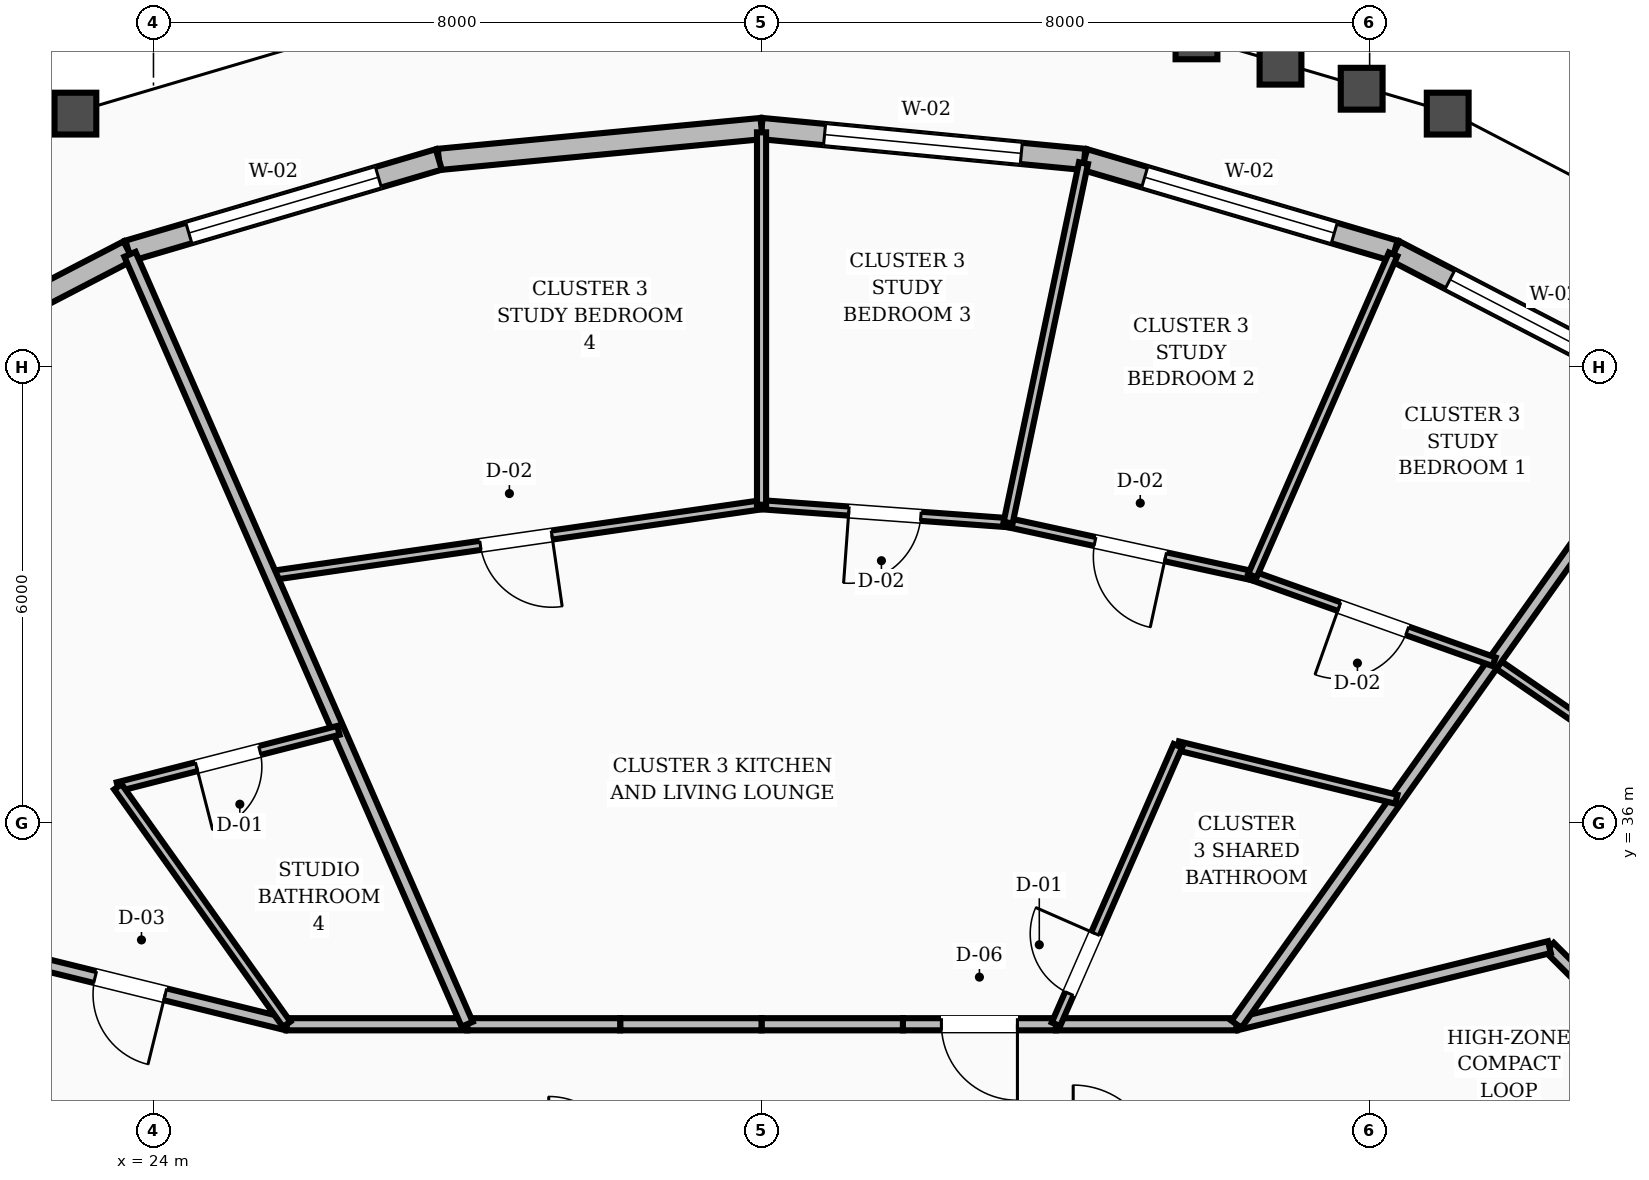
"""IFC4 building model, lengths in metres.
Left out: names, types, materials, properties, quantities, classifications, styles, units other than length and angle.
Written with IfcOpenShell. Run it as: python <this file> out.ifc"""

import sys

from ifc_helpers import new_model, si_unit, direction, frame, frame_2d, origin, place, context, subcontext, project, spatial, rectangle, extrude, element, fill, save


model = new_model("IFC4")
c1 = context("Model", 3, precision=1e-05, world=origin(), true_north=direction((0.0, 1.0)))
c2 = subcontext(c1, "Body", "Model", "MODEL_VIEW")
j1 = project(units=[si_unit("LENGTHUNIT", "METRE"), si_unit("PLANEANGLEUNIT", "RADIAN")], contexts=[c1])
p1 = place(None, origin())
s1 = spatial("IfcSite", under=j1, at=p1, CompositionType="ELEMENT")
p2 = place(p1, origin())
s2 = spatial("IfcBuilding", under=s1, at=p2, CompositionType="ELEMENT")
p3 = place(p2, frame((0.0, 0.0, 240.0)))
s3 = spatial("IfcBuildingStorey", under=s2, at=p3, CompositionType="ELEMENT", Elevation=240.0)
p4 = place(p3, frame((44.092, 41.572, 0.0), z_axis=(0.0, 0.0, 1.0), x_axis=(-0.887588000353, 0.460638189504, 0.0)))
e1 = element("IfcWall", 1, at=p4, inside=s3, PredefinedType="STANDARD", context=c2, shape_type="SweptSolid", body=[
    extrude(rectangle(XDim=4.24, YDim=0.28, at=frame_2d((2.12, 0.0))), origin(), (0.0, 0.0, 1.0), 2.88),
])
p5 = place(p4, frame((0.82, 0.0, 0.8)))
e2 = element("IfcOpeningElement", 2, at=p5, cuts=e1, PredefinedType="OPENING", context=c2, shape_type="SweptSolid", body=[
    extrude(rectangle(XDim=2.6, YDim=1.65, at=frame_2d((1.3, 0.825))), frame((0.0, 0.15, 0.0), z_axis=(0.0, -1.0, 0.0), x_axis=(1.0, 0.0, 0.0)), (0.0, 0.0, 1.0), 0.3),
])
p6 = place(p3, frame((40.329, 43.525, 0.0), z_axis=(0.0, 0.0, 1.0), x_axis=(-0.95925857755, 0.28252961154, 0.0)))
e3 = element("IfcWall", 3, at=p6, inside=s3, PredefinedType="STANDARD", context=c2, shape_type="SweptSolid", body=[
    extrude(rectangle(XDim=4.257, YDim=0.28, at=frame_2d((2.128, 0.0))), origin(), (0.0, 0.0, 1.0), 2.88),
])
p7 = place(p6, frame((0.828, 0.0, 0.8)))
e4 = element("IfcOpeningElement", 4, at=p7, cuts=e3, PredefinedType="OPENING", context=c2, shape_type="SweptSolid", body=[
    extrude(rectangle(XDim=2.6, YDim=1.65, at=frame_2d((1.3, 0.825))), frame((0.0, 0.15, 0.0), z_axis=(0.0, -1.0, 0.0), x_axis=(1.0, 0.0, 0.0)), (0.0, 0.0, 1.0), 0.3),
])
p8 = place(p3, frame((36.246, 44.728, 0.0), z_axis=(0.0, 0.0, 1.0), x_axis=(-0.995459644973, 0.09518453252, 0.0)))
e5 = element("IfcWall", 5, at=p8, inside=s3, PredefinedType="STANDARD", context=c2, shape_type="SweptSolid", body=[
    extrude(rectangle(XDim=4.265, YDim=0.28, at=frame_2d((2.133, 0.0))), origin(), (0.0, 0.0, 1.0), 2.88),
])
p9 = place(p8, frame((0.833, 0.0, 0.8)))
e6 = element("IfcOpeningElement", 6, at=p9, cuts=e5, PredefinedType="OPENING", context=c2, shape_type="SweptSolid", body=[
    extrude(rectangle(XDim=2.6, YDim=1.65, at=frame_2d((1.3, 0.825))), frame((0.0, 0.15, 0.0), z_axis=(0.0, -1.0, 0.0), x_axis=(1.0, 0.0, 0.0)), (0.0, 0.0, 1.0), 0.3),
])
p10 = place(p3, frame((32.0, 45.134, 0.0), z_axis=(0.0, 0.0, 1.0), x_axis=(-0.995459644973, -0.09518453252, 0.0)))
e7 = element("IfcWall", 7, at=p10, inside=s3, PredefinedType="STANDARD", context=c2, shape_type="SweptSolid", body=[
    extrude(rectangle(XDim=4.265, YDim=0.28, at=frame_2d((2.133, 0.0))), origin(), (0.0, 0.0, 1.0), 2.88),
])
p11 = place(p3, frame((27.754, 44.728, 0.0), z_axis=(0.0, 0.0, 1.0), x_axis=(-0.95925857755, -0.28252961154, 0.0)))
e8 = element("IfcWall", 8, at=p11, inside=s3, PredefinedType="STANDARD", context=c2, shape_type="SweptSolid", body=[
    extrude(rectangle(XDim=4.257, YDim=0.28, at=frame_2d((2.128, 0.0))), origin(), (0.0, 0.0, 1.0), 2.88),
])
p12 = place(p11, frame((0.828, 0.0, 0.8)))
e9 = element("IfcOpeningElement", 9, at=p12, cuts=e8, PredefinedType="OPENING", context=c2, shape_type="SweptSolid", body=[
    extrude(rectangle(XDim=2.6, YDim=1.65, at=frame_2d((1.3, 0.825))), frame((0.0, 0.15, 0.0), z_axis=(0.0, -1.0, 0.0), x_axis=(1.0, 0.0, 0.0)), (0.0, 0.0, 1.0), 0.3),
])
p13 = place(p3, frame((23.671, 43.525, 0.0), z_axis=(0.0, 0.0, 1.0), x_axis=(-0.887588000353, -0.460638189504, 0.0)))
e10 = element("IfcWall", 10, at=p13, inside=s3, PredefinedType="STANDARD", context=c2, shape_type="SweptSolid", body=[
    extrude(rectangle(XDim=4.24, YDim=0.28, at=frame_2d((2.12, 0.0))), origin(), (0.0, 0.0, 1.0), 2.88),
])
p14 = place(p3, frame((44.427, 32.303, 0.0), z_axis=(0.0, 0.0, 1.0), x_axis=(-0.707106781187, 0.707106781187, 0.0)))
e11 = element("IfcWall", 11, at=p14, inside=s3, PredefinedType="SOLIDWALL", context=c2, shape_type="SweptSolid", body=[
    extrude(rectangle(XDim=2.916, YDim=0.16, at=frame_2d((1.458, 0.0))), origin(), (0.0, 0.0, 1.0), 2.87),
])
p15 = place(p3, frame((42.365, 34.365, 0.0), z_axis=(0.0, 0.0, 1.0), x_axis=(-0.970939799552, -0.239323850978, 0.0)))
e12 = element("IfcWall", 12, at=p15, inside=s3, PredefinedType="SOLIDWALL", context=c2, shape_type="SweptSolid", body=[
    extrude(rectangle(XDim=4.241, YDim=0.16, at=frame_2d((2.12, 0.0))), origin(), (0.0, 0.0, 1.0), 2.87),
])
p16 = place(p3, frame((38.248, 33.35, 0.0), z_axis=(0.0, 0.0, 1.0), x_axis=(-1.0, 0.0, 0.0)))
e13 = element("IfcWall", 13, at=p16, inside=s3, PredefinedType="SOLIDWALL", context=c2, shape_type="SweptSolid", body=[
    extrude(rectangle(XDim=2.375, YDim=0.16, at=frame_2d((1.188, 0.0))), origin(), (0.0, 0.0, 1.0), 2.87),
])
p17 = place(p3, frame((35.873, 33.35, 0.0), z_axis=(0.0, 0.0, 1.0), x_axis=(-1.0, 0.0, 0.0)))
e14 = element("IfcWall", 14, at=p17, inside=s3, PredefinedType="SOLIDWALL", context=c2, shape_type="SweptSolid", body=[
    extrude(rectangle(XDim=2.013, YDim=0.16, at=frame_2d((1.006, 0.0))), origin(), (0.0, 0.0, 1.0), 2.87),
])
p18 = place(p17, frame((0.507, 0.0, 0.0)))
e15 = element("IfcOpeningElement", 15, at=p18, cuts=e14, PredefinedType="OPENING", context=c2, shape_type="SweptSolid", body=[
    extrude(rectangle(XDim=1.0, YDim=2.1, at=frame_2d((0.5, 1.05))), frame((0.0, 0.09, 0.0), z_axis=(0.0, -1.0, 0.0), x_axis=(1.0, 0.0, 0.0)), (0.0, 0.0, 1.0), 0.18),
])
for number, where, z_axis, x_axis in (
    (16, (33.86, 33.35, 0.0), (0.0, 0.0, 1.0), (-1.0, 0.0, 0.0)),
    (17, (32.0, 33.35, 0.0), (0.0, 0.0, 1.0), (-1.0, 0.0, 0.0)),
):
    element("IfcWall", number, at=place(p3, frame(where, z_axis=z_axis, x_axis=x_axis)), inside=s3, PredefinedType="SOLIDWALL", context=c2, shape_type="SweptSolid", body=[
        extrude(rectangle(XDim=1.86, YDim=0.16, at=frame_2d((0.93, 0.0))), origin(), (0.0, 0.0, 1.0), 2.87),
    ])
p19 = place(p3, frame((30.14, 33.35, 0.0), z_axis=(0.0, 0.0, 1.0), x_axis=(-1.0, 0.0, 0.0)))
e18 = element("IfcWall", 18, at=p19, inside=s3, PredefinedType="SOLIDWALL", context=c2, shape_type="SweptSolid", body=[
    extrude(rectangle(XDim=2.013, YDim=0.16, at=frame_2d((1.006, 0.0))), origin(), (0.0, 0.0, 1.0), 2.87),
])
p20 = place(p3, frame((28.127, 33.35, 0.0), z_axis=(0.0, 0.0, 1.0), x_axis=(-1.0, 0.0, 0.0)))
e19 = element("IfcWall", 19, at=p20, inside=s3, PredefinedType="SOLIDWALL", context=c2, shape_type="SweptSolid", body=[
    extrude(rectangle(XDim=2.375, YDim=0.16, at=frame_2d((1.188, 0.0))), origin(), (0.0, 0.0, 1.0), 2.87),
])
p21 = place(p3, frame((25.752, 33.35, 0.0), z_axis=(0.0, 0.0, 1.0), x_axis=(-0.970939799552, 0.239323850978, 0.0)))
e20 = element("IfcWall", 20, at=p21, inside=s3, PredefinedType="SOLIDWALL", context=c2, shape_type="SweptSolid", body=[
    extrude(rectangle(XDim=4.241, YDim=0.16, at=frame_2d((2.12, 0.0))), origin(), (0.0, 0.0, 1.0), 2.87),
])
p22 = place(p21, frame((1.646, 0.0, 0.0)))
e21 = element("IfcOpeningElement", 21, at=p22, cuts=e20, PredefinedType="OPENING", context=c2, shape_type="SweptSolid", body=[
    extrude(rectangle(XDim=0.95, YDim=2.1, at=frame_2d((0.475, 1.05))), frame((0.0, 0.09, 0.0), z_axis=(0.0, -1.0, 0.0), x_axis=(1.0, 0.0, 0.0)), (0.0, 0.0, 1.0), 0.18),
])
p23 = place(p3, frame((47.446, 34.117, 0.0), z_axis=(0.0, 0.0, 1.0), x_axis=(-0.823453694919, 0.567383479072, 0.0)))
e22 = element("IfcWall", 22, at=p23, inside=s3, PredefinedType="PARTITIONING", context=c2, shape_type="SweptSolid", body=[
    extrude(rectangle(XDim=7.053, YDim=0.12, at=frame_2d((3.527, 0.0))), origin(), (0.0, 0.0, 1.0), 2.87),
])
p24 = place(p23, frame((3.052, 0.0, 0.0)))
e23 = element("IfcOpeningElement", 23, at=p24, cuts=e22, PredefinedType="OPENING", context=c2, shape_type="SweptSolid", body=[
    extrude(rectangle(XDim=0.95, YDim=2.1, at=frame_2d((0.475, 1.05))), frame((0.0, 0.07, 0.0), z_axis=(0.0, -1.0, 0.0), x_axis=(1.0, 0.0, 0.0)), (0.0, 0.0, 1.0), 0.14),
])
p25 = place(p3, frame((38.248, 33.35, 0.0), z_axis=(0.0, 0.0, 1.0), x_axis=(0.579377676694, 0.815059205058, 0.0)))
e24 = element("IfcWall", 24, at=p25, inside=s3, PredefinedType="SOLIDWALL", context=c2, shape_type="SweptSolid", body=[
    extrude(rectangle(XDim=10.038, YDim=0.16, at=frame_2d((5.019, 0.0))), origin(), (0.0, 0.0, 1.0), 2.87),
])
p26 = place(p3, frame((40.352, 36.31, 0.0), z_axis=(0.0, 0.0, 1.0), x_axis=(-0.971357969052, 0.237620908084, 0.0)))
e25 = element("IfcWall", 25, at=p26, inside=s3, PredefinedType="PARTITIONING", context=c2, shape_type="SweptSolid", body=[
    extrude(rectangle(XDim=2.959, YDim=0.12, at=frame_2d((1.479, 0.0))), origin(), (0.0, 0.0, 1.0), 2.87),
])
p27 = place(p3, frame((35.873, 33.35, 0.0), z_axis=(0.0, 0.0, 1.0), x_axis=(0.401215916975, 0.915983508566, 0.0)))
e26 = element("IfcWall", 26, at=p27, inside=s3, PredefinedType="PARTITIONING", context=c2, shape_type="SweptSolid", body=[
    extrude(rectangle(XDim=3.999, YDim=0.12, at=frame_2d((2.0, 0.0))), origin(), (0.0, 0.0, 1.0), 2.87),
])
p28 = place(p27, frame((0.44, 0.0, 0.0)))
e27 = element("IfcOpeningElement", 27, at=p28, cuts=e26, PredefinedType="OPENING", context=c2, shape_type="SweptSolid", body=[
    extrude(rectangle(XDim=0.86, YDim=2.1, at=frame_2d((0.43, 1.05))), frame((0.0, 0.07, 0.0), z_axis=(0.0, -1.0, 0.0), x_axis=(1.0, 0.0, 0.0)), (0.0, 0.0, 1.0), 0.14),
])
p29 = place(p3, frame((41.637, 38.119, 0.0), z_axis=(0.0, 0.0, 1.0), x_axis=(-0.942011593526, 0.335580329671, 0.0)))
e28 = element("IfcWall", 28, at=p29, inside=s3, PredefinedType="PARTITIONING", context=c2, shape_type="SweptSolid", body=[
    extrude(rectangle(XDim=3.376, YDim=0.12, at=frame_2d((1.688, 0.0))), origin(), (0.0, 0.0, 1.0), 2.87),
])
p30 = place(p29, frame((1.213, 0.0, 0.0)))
e29 = element("IfcOpeningElement", 29, at=p30, cuts=e28, PredefinedType="OPENING", context=c2, shape_type="SweptSolid", body=[
    extrude(rectangle(XDim=0.95, YDim=2.1, at=frame_2d((0.475, 1.05))), frame((0.0, 0.07, 0.0), z_axis=(0.0, -1.0, 0.0), x_axis=(1.0, 0.0, 0.0)), (0.0, 0.0, 1.0), 0.14),
])
p31 = place(p3, frame((38.458, 39.252, 0.0), z_axis=(0.0, 0.0, 1.0), x_axis=(-0.977245996874, 0.21210907947, 0.0)))
e30 = element("IfcWall", 30, at=p31, inside=s3, PredefinedType="PARTITIONING", context=c2, shape_type="SweptSolid", body=[
    extrude(rectangle(XDim=3.288, YDim=0.12, at=frame_2d((1.644, 0.0))), origin(), (0.0, 0.0, 1.0), 2.87),
])
p32 = place(p31, frame((1.169, 0.0, 0.0)))
e31 = element("IfcOpeningElement", 31, at=p32, cuts=e30, PredefinedType="OPENING", context=c2, shape_type="SweptSolid", body=[
    extrude(rectangle(XDim=0.95, YDim=2.1, at=frame_2d((0.475, 1.05))), frame((0.0, 0.07, 0.0), z_axis=(0.0, -1.0, 0.0), x_axis=(1.0, 0.0, 0.0)), (0.0, 0.0, 1.0), 0.14),
])
p33 = place(p3, frame((38.458, 39.252, 0.0), z_axis=(0.0, 0.0, 1.0), x_axis=(0.401165666386, 0.916005517512, 0.0)))
e32 = element("IfcWall", 32, at=p33, inside=s3, PredefinedType="PARTITIONING", context=c2, shape_type="SweptSolid", body=[
    extrude(rectangle(XDim=4.615, YDim=0.12, at=frame_2d((2.308, 0.0))), origin(), (0.0, 0.0, 1.0), 2.87),
])
p34 = place(p3, frame((35.244, 39.949, 0.0), z_axis=(0.0, 0.0, 1.0), x_axis=(-0.997373019742, 0.072436589452, 0.0)))
e33 = element("IfcWall", 33, at=p34, inside=s3, PredefinedType="PARTITIONING", context=c2, shape_type="SweptSolid", body=[
    extrude(rectangle(XDim=3.252, YDim=0.12, at=frame_2d((1.626, 0.0))), origin(), (0.0, 0.0, 1.0), 2.87),
])
p35 = place(p34, frame((1.151, 0.0, 0.0)))
e34 = element("IfcOpeningElement", 34, at=p35, cuts=e33, PredefinedType="OPENING", context=c2, shape_type="SweptSolid", body=[
    extrude(rectangle(XDim=0.95, YDim=2.1, at=frame_2d((0.475, 1.05))), frame((0.0, 0.07, 0.0), z_axis=(0.0, -1.0, 0.0), x_axis=(1.0, 0.0, 0.0)), (0.0, 0.0, 1.0), 0.14),
])
p36 = place(p3, frame((35.244, 39.949, 0.0), z_axis=(0.0, 0.0, 1.0), x_axis=(0.205259333171, 0.978707620358, 0.0)))
e35 = element("IfcWall", 35, at=p36, inside=s3, PredefinedType="PARTITIONING", context=c2, shape_type="SweptSolid", body=[
    extrude(rectangle(XDim=4.833, YDim=0.12, at=frame_2d((2.416, 0.0))), origin(), (0.0, 0.0, 1.0), 2.87),
])
p37 = place(p3, frame((32.0, 40.185, 0.0), z_axis=(0.0, 0.0, 1.0), x_axis=(-0.989720707907, -0.143013706829, 0.0)))
e36 = element("IfcWall", 36, at=p37, inside=s3, PredefinedType="PARTITIONING", context=c2, shape_type="SweptSolid", body=[
    extrude(rectangle(XDim=6.525, YDim=0.12, at=frame_2d((3.262, 0.0))), origin(), (0.0, 0.0, 1.0), 2.87),
])
p38 = place(p37, frame((2.787, 0.0, 0.0)))
e37 = element("IfcOpeningElement", 37, at=p38, cuts=e36, PredefinedType="OPENING", context=c2, shape_type="SweptSolid", body=[
    extrude(rectangle(XDim=0.95, YDim=2.1, at=frame_2d((0.475, 1.05))), frame((0.0, 0.07, 0.0), z_axis=(0.0, -1.0, 0.0), x_axis=(1.0, 0.0, 0.0)), (0.0, 0.0, 1.0), 0.14),
])
p39 = place(p3, frame((32.0, 40.185, 0.0), z_axis=(0.0, 0.0, 1.0), x_axis=(0.0, 1.0, 0.0)))
e38 = element("IfcWall", 38, at=p39, inside=s3, PredefinedType="PARTITIONING", context=c2, shape_type="SweptSolid", body=[
    extrude(rectangle(XDim=4.899, YDim=0.12, at=frame_2d((2.45, 0.0))), origin(), (0.0, 0.0, 1.0), 2.87),
])
p40 = place(p3, frame((28.127, 33.35, 0.0), z_axis=(0.0, 0.0, 1.0), x_axis=(-0.401173204802, 0.916002216017, 0.0)))
e39 = element("IfcWall", 39, at=p40, inside=s3, PredefinedType="SOLIDWALL", context=c2, shape_type="SweptSolid", body=[
    extrude(rectangle(XDim=11.058, YDim=0.16, at=frame_2d((5.529, 0.0))), origin(), (0.0, 0.0, 1.0), 2.87),
])
p41 = place(p3, frame((26.434, 37.217, 0.0), z_axis=(0.0, 0.0, 1.0), x_axis=(-0.968819540563, -0.247767426879, 0.0)))
e40 = element("IfcWall", 40, at=p41, inside=s3, PredefinedType="PARTITIONING", context=c2, shape_type="SweptSolid", body=[
    extrude(rectangle(XDim=2.996, YDim=0.12, at=frame_2d((1.498, 0.0))), origin(), (0.0, 0.0, 1.0), 2.87),
])
p42 = place(p41, frame((1.068, 0.0, 0.0)))
e41 = element("IfcOpeningElement", 41, at=p42, cuts=e40, PredefinedType="OPENING", context=c2, shape_type="SweptSolid", body=[
    extrude(rectangle(XDim=0.86, YDim=2.1, at=frame_2d((0.43, 1.05))), frame((0.0, 0.07, 0.0), z_axis=(0.0, -1.0, 0.0), x_axis=(1.0, 0.0, 0.0)), (0.0, 0.0, 1.0), 0.14),
])
p43 = place(p3, frame((25.752, 33.35, 0.0), z_axis=(0.0, 0.0, 1.0), x_axis=(-0.579393118197, 0.81504822838, 0.0)))
e42 = element("IfcWall", 42, at=p43, inside=s3, PredefinedType="PARTITIONING", context=c2, shape_type="SweptSolid", body=[
    extrude(rectangle(XDim=3.833, YDim=0.12, at=frame_2d((1.917, 0.0))), origin(), (0.0, 0.0, 1.0), 2.87),
])
p44 = place(p5, origin())
e43 = element("IfcWindow", 43, at=p44, inside=s3, PartitioningType="SINGLE_PANEL", PredefinedType="WINDOW", context=c2, shape_type="SweptSolid", body=[
    extrude(rectangle(XDim=2.6, YDim=1.65, at=frame_2d((1.3, 0.825))), frame((0.0, 0.03, 0.0), z_axis=(0.0, -1.0, 0.0), x_axis=(1.0, 0.0, 0.0)), (0.0, 0.0, 1.0), 0.06),
])
fill(e2, e43)
p45 = place(p7, origin())
e44 = element("IfcWindow", 44, at=p45, inside=s3, PartitioningType="SINGLE_PANEL", PredefinedType="WINDOW", context=c2, shape_type="SweptSolid", body=[
    extrude(rectangle(XDim=2.6, YDim=1.65, at=frame_2d((1.3, 0.825))), frame((0.0, 0.03, 0.0), z_axis=(0.0, -1.0, 0.0), x_axis=(1.0, 0.0, 0.0)), (0.0, 0.0, 1.0), 0.06),
])
fill(e4, e44)
p46 = place(p9, origin())
e45 = element("IfcWindow", 45, at=p46, inside=s3, PartitioningType="SINGLE_PANEL", PredefinedType="WINDOW", context=c2, shape_type="SweptSolid", body=[
    extrude(rectangle(XDim=2.6, YDim=1.65, at=frame_2d((1.3, 0.825))), frame((0.0, 0.03, 0.0), z_axis=(0.0, -1.0, 0.0), x_axis=(1.0, 0.0, 0.0)), (0.0, 0.0, 1.0), 0.06),
])
fill(e6, e45)
p47 = place(p12, origin())
e46 = element("IfcWindow", 46, at=p47, inside=s3, PartitioningType="SINGLE_PANEL", PredefinedType="WINDOW", context=c2, shape_type="SweptSolid", body=[
    extrude(rectangle(XDim=2.6, YDim=1.65, at=frame_2d((1.3, 0.825))), frame((0.0, 0.03, 0.0), z_axis=(0.0, -1.0, 0.0), x_axis=(1.0, 0.0, 0.0)), (0.0, 0.0, 1.0), 0.06),
])
fill(e9, e46)
p48 = place(p28, origin())
e47 = element("IfcDoor", 47, at=p48, inside=s3, OperationType="SINGLE_SWING_RIGHT", PredefinedType="DOOR", context=c2, shape_type="SweptSolid", body=[
    extrude(rectangle(XDim=0.86, YDim=2.1, at=frame_2d((0.43, 1.05))), frame((0.0, 0.025, 0.0), z_axis=(0.0, -1.0, 0.0), x_axis=(1.0, 0.0, 0.0)), (0.0, 0.0, 1.0), 0.05),
])
fill(e27, e47)
p49 = place(p18, origin())
e48 = element("IfcDoor", 48, at=p49, inside=s3, OperationType="SINGLE_SWING_LEFT", PredefinedType="DOOR", context=c2, shape_type="SweptSolid", body=[
    extrude(rectangle(XDim=1.0, YDim=2.1, at=frame_2d((0.5, 1.05))), frame((0.0, 0.025, 0.0), z_axis=(0.0, -1.0, 0.0), x_axis=(1.0, 0.0, 0.0)), (0.0, 0.0, 1.0), 0.05),
])
fill(e15, e48)
p50 = place(p30, origin())
e49 = element("IfcDoor", 49, at=p50, inside=s3, OperationType="SINGLE_SWING_RIGHT", PredefinedType="DOOR", context=c2, shape_type="SweptSolid", body=[
    extrude(rectangle(XDim=0.95, YDim=2.1, at=frame_2d((0.475, 1.05))), frame((0.0, 0.025, 0.0), z_axis=(0.0, -1.0, 0.0), x_axis=(1.0, 0.0, 0.0)), (0.0, 0.0, 1.0), 0.05),
])
fill(e29, e49)
p51 = place(p32, origin())
e50 = element("IfcDoor", 50, at=p51, inside=s3, OperationType="SINGLE_SWING_LEFT", PredefinedType="DOOR", context=c2, shape_type="SweptSolid", body=[
    extrude(rectangle(XDim=0.95, YDim=2.1, at=frame_2d((0.475, 1.05))), frame((0.0, 0.025, 0.0), z_axis=(0.0, -1.0, 0.0), x_axis=(1.0, 0.0, 0.0)), (0.0, 0.0, 1.0), 0.05),
])
fill(e31, e50)
p52 = place(p35, origin())
e51 = element("IfcDoor", 51, at=p52, inside=s3, OperationType="SINGLE_SWING_RIGHT", PredefinedType="DOOR", context=c2, shape_type="SweptSolid", body=[
    extrude(rectangle(XDim=0.95, YDim=2.1, at=frame_2d((0.475, 1.05))), frame((0.0, 0.025, 0.0), z_axis=(0.0, -1.0, 0.0), x_axis=(1.0, 0.0, 0.0)), (0.0, 0.0, 1.0), 0.05),
])
fill(e34, e51)
p53 = place(p38, origin())
e52 = element("IfcDoor", 52, at=p53, inside=s3, OperationType="SINGLE_SWING_LEFT", PredefinedType="DOOR", context=c2, shape_type="SweptSolid", body=[
    extrude(rectangle(XDim=0.95, YDim=2.1, at=frame_2d((0.475, 1.05))), frame((0.0, 0.025, 0.0), z_axis=(0.0, -1.0, 0.0), x_axis=(1.0, 0.0, 0.0)), (0.0, 0.0, 1.0), 0.05),
])
fill(e37, e52)
p54 = place(p42, origin())
e53 = element("IfcDoor", 53, at=p54, inside=s3, OperationType="SINGLE_SWING_RIGHT", PredefinedType="DOOR", context=c2, shape_type="SweptSolid", body=[
    extrude(rectangle(XDim=0.86, YDim=2.1, at=frame_2d((0.43, 1.05))), frame((0.0, 0.025, 0.0), z_axis=(0.0, -1.0, 0.0), x_axis=(1.0, 0.0, 0.0)), (0.0, 0.0, 1.0), 0.05),
])
fill(e41, e53)
p55 = place(p22, origin())
e54 = element("IfcDoor", 54, at=p55, inside=s3, OperationType="SINGLE_SWING_LEFT", PredefinedType="DOOR", context=c2, shape_type="SweptSolid", body=[
    extrude(rectangle(XDim=0.95, YDim=2.1, at=frame_2d((0.475, 1.05))), frame((0.0, 0.025, 0.0), z_axis=(0.0, -1.0, 0.0), x_axis=(1.0, 0.0, 0.0)), (0.0, 0.0, 1.0), 0.05),
])
fill(e21, e54)
save(model, sys.argv[1])
